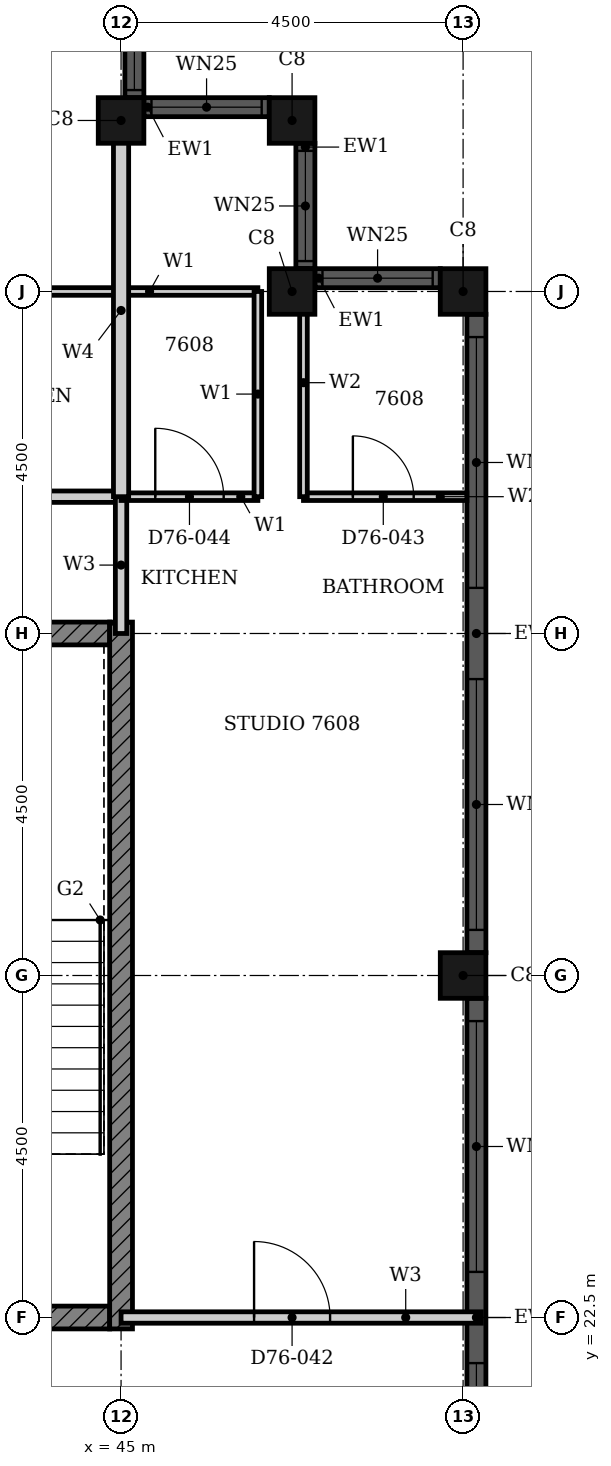
"""IFC4 building model, lengths in metres.
Left out: names, types, materials, properties, quantities, classifications, styles, units other than length and angle.
Written with IfcOpenShell. Run it as: python <this file> out.ifc"""

import sys

from ifc_helpers import new_model, si_unit, direction, frame, frame_2d, origin, origin_2d, place, context, subcontext, project, spatial, rectangle, hollow_rectangle, extrude, element, fill, save


model = new_model("IFC4")
c1 = context("Model", 3, precision=1e-05, world=origin(), true_north=direction((0.0, 1.0)))
c2 = subcontext(c1, "Body", "Model", "MODEL_VIEW")
j1 = project(units=[si_unit("LENGTHUNIT", "METRE"), si_unit("PLANEANGLEUNIT", "RADIAN")], contexts=[c1])
p1 = place(None, origin())
s1 = spatial("IfcSite", under=j1, at=p1, CompositionType="ELEMENT")
p2 = place(p1, origin())
s2 = spatial("IfcBuilding", under=s1, at=p2, CompositionType="ELEMENT")
p3 = place(p2, frame((0.0, 0.0, 298.2)))
s3 = spatial("IfcBuildingStorey", under=s2, at=p3, CompositionType="ELEMENT", Elevation=298.2)
for number, where, z_axis, x_axis in (
    (1, (49.5, 27.0, 0.0), (0.0, 0.0, 1.0), (1.0, 0.0, 0.0)),
    (2, (49.5, 36.0, 0.0), (0.0, 0.0, 1.0), (1.0, 0.0, 0.0)),
    (3, (47.25, 36.0, 0.0), (0.0, 0.0, 1.0), (1.0, 0.0, 0.0)),
    (4, (47.25, 38.25, 0.0), (0.0, 0.0, 1.0), (1.0, 0.0, 0.0)),
    (5, (45.0, 38.25, 0.0), (0.0, 0.0, 1.0), (1.0, 0.0, 0.0)),
):
    element("IfcColumn", number, at=place(p3, frame(where, z_axis=z_axis, x_axis=x_axis)), inside=s3, PredefinedType="COLUMN", context=c2, shape_type="SweptSolid", body=[
        extrude(hollow_rectangle(XDim=0.6, YDim=0.6, WallThickness=0.02, at=origin_2d()), origin(), (0.0, 0.0, 1.0), 3.7),
    ])
p4 = place(p3, frame((49.675, 18.3, 0.0), z_axis=(0.0, 0.0, 1.0), x_axis=(0.0, 1.0, 0.0)))
e6 = element("IfcWall", 6, at=p4, inside=s3, PredefinedType="SOLIDWALL", context=c2, shape_type="SweptSolid", body=[
    extrude(rectangle(XDim=8.4, YDim=0.25, at=frame_2d((4.2, 0.0))), origin(), (0.0, 0.0, 1.0), 3.7),
])
p5 = place(p4, frame((0.3, 0.0, 0.45)))
e7 = element("IfcOpeningElement", 7, at=p5, cuts=e6, PredefinedType="OPENING", context=c2, shape_type="SweptSolid", body=[
    extrude(rectangle(XDim=3.3, YDim=2.3, at=frame_2d((1.65, 1.15))), frame((0.0, 0.135, 0.0), z_axis=(0.0, -1.0, 0.0), x_axis=(1.0, 0.0, 0.0)), (0.0, 0.0, 1.0), 0.27),
])
p6 = place(p4, frame((4.8, 0.0, 0.45)))
e8 = element("IfcOpeningElement", 8, at=p6, cuts=e6, PredefinedType="OPENING", context=c2, shape_type="SweptSolid", body=[
    extrude(rectangle(XDim=3.3, YDim=2.3, at=frame_2d((1.65, 1.15))), frame((0.0, 0.135, 0.0), z_axis=(0.0, -1.0, 0.0), x_axis=(1.0, 0.0, 0.0)), (0.0, 0.0, 1.0), 0.27),
])
p7 = place(p3, frame((49.675, 27.3, 0.0), z_axis=(0.0, 0.0, 1.0), x_axis=(0.0, 1.0, 0.0)))
e9 = element("IfcWall", 9, at=p7, inside=s3, PredefinedType="SOLIDWALL", context=c2, shape_type="SweptSolid", body=[
    extrude(rectangle(XDim=8.4, YDim=0.25, at=frame_2d((4.2, 0.0))), origin(), (0.0, 0.0, 1.0), 3.7),
])
p8 = place(p7, frame((0.3, 0.0, 0.45)))
e10 = element("IfcOpeningElement", 10, at=p8, cuts=e9, PredefinedType="OPENING", context=c2, shape_type="SweptSolid", body=[
    extrude(rectangle(XDim=3.3, YDim=2.3, at=frame_2d((1.65, 1.15))), frame((0.0, 0.135, 0.0), z_axis=(0.0, -1.0, 0.0), x_axis=(1.0, 0.0, 0.0)), (0.0, 0.0, 1.0), 0.27),
])
p9 = place(p7, frame((4.8, 0.0, 0.45)))
e11 = element("IfcOpeningElement", 11, at=p9, cuts=e9, PredefinedType="OPENING", context=c2, shape_type="SweptSolid", body=[
    extrude(rectangle(XDim=3.3, YDim=2.3, at=frame_2d((1.65, 1.15))), frame((0.0, 0.135, 0.0), z_axis=(0.0, -1.0, 0.0), x_axis=(1.0, 0.0, 0.0)), (0.0, 0.0, 1.0), 0.27),
])
p10 = place(p3, frame((49.2, 36.175, 0.0), z_axis=(0.0, 0.0, 1.0), x_axis=(-1.0, 0.0, 0.0)))
e12 = element("IfcWall", 12, at=p10, inside=s3, PredefinedType="SOLIDWALL", context=c2, shape_type="SweptSolid", body=[
    extrude(rectangle(XDim=1.65, YDim=0.25, at=frame_2d((0.825, 0.0))), origin(), (0.0, 0.0, 1.0), 3.7),
])
p11 = place(p10, frame((0.1, 0.0, 0.9)))
e13 = element("IfcOpeningElement", 13, at=p11, cuts=e12, PredefinedType="OPENING", context=c2, shape_type="SweptSolid", body=[
    extrude(rectangle(XDim=1.45, YDim=1.85, at=frame_2d((0.725, 0.925))), frame((0.0, 0.135, 0.0), z_axis=(0.0, -1.0, 0.0), x_axis=(1.0, 0.0, 0.0)), (0.0, 0.0, 1.0), 0.27),
])
p12 = place(p3, frame((47.425, 36.3, 0.0), z_axis=(0.0, 0.0, 1.0), x_axis=(0.0, 1.0, 0.0)))
e14 = element("IfcWall", 14, at=p12, inside=s3, PredefinedType="SOLIDWALL", context=c2, shape_type="SweptSolid", body=[
    extrude(rectangle(XDim=1.65, YDim=0.25, at=frame_2d((0.825, 0.0))), origin(), (0.0, 0.0, 1.0), 3.7),
])
p13 = place(p12, frame((0.1, 0.0, 0.9)))
e15 = element("IfcOpeningElement", 15, at=p13, cuts=e14, PredefinedType="OPENING", context=c2, shape_type="SweptSolid", body=[
    extrude(rectangle(XDim=1.45, YDim=1.85, at=frame_2d((0.725, 0.925))), frame((0.0, 0.135, 0.0), z_axis=(0.0, -1.0, 0.0), x_axis=(1.0, 0.0, 0.0)), (0.0, 0.0, 1.0), 0.27),
])
p14 = place(p3, frame((46.95, 38.425, 0.0), z_axis=(0.0, 0.0, 1.0), x_axis=(-1.0, 0.0, 0.0)))
e16 = element("IfcWall", 16, at=p14, inside=s3, PredefinedType="SOLIDWALL", context=c2, shape_type="SweptSolid", body=[
    extrude(rectangle(XDim=1.65, YDim=0.25, at=frame_2d((0.825, 0.0))), origin(), (0.0, 0.0, 1.0), 3.7),
])
p15 = place(p14, frame((0.1, 0.0, 0.9)))
e17 = element("IfcOpeningElement", 17, at=p15, cuts=e16, PredefinedType="OPENING", context=c2, shape_type="SweptSolid", body=[
    extrude(rectangle(XDim=1.45, YDim=1.85, at=frame_2d((0.725, 0.925))), frame((0.0, 0.135, 0.0), z_axis=(0.0, -1.0, 0.0), x_axis=(1.0, 0.0, 0.0)), (0.0, 0.0, 1.0), 0.27),
])
p16 = place(p3, frame((45.175, 38.55, 0.0), z_axis=(0.0, 0.0, 1.0), x_axis=(0.0, 1.0, 0.0)))
e18 = element("IfcWall", 18, at=p16, inside=s3, PredefinedType="SOLIDWALL", context=c2, shape_type="SweptSolid", body=[
    extrude(rectangle(XDim=1.65, YDim=0.25, at=frame_2d((0.825, 0.0))), origin(), (0.0, 0.0, 1.0), 3.7),
])
p17 = place(p16, frame((0.1, 0.0, 0.9)))
e19 = element("IfcOpeningElement", 19, at=p17, cuts=e18, PredefinedType="OPENING", context=c2, shape_type="SweptSolid", body=[
    extrude(rectangle(XDim=1.45, YDim=1.85, at=frame_2d((0.725, 0.925))), frame((0.0, 0.135, 0.0), z_axis=(0.0, -1.0, 0.0), x_axis=(1.0, 0.0, 0.0)), (0.0, 0.0, 1.0), 0.27),
])
p18 = place(p3, frame((30.339, 22.5, 0.0), z_axis=(0.0, 0.0, 1.0), x_axis=(1.0, 0.0, 0.0)))
e20 = element("IfcWall", 20, at=p18, inside=s3, PredefinedType="SHEAR", context=c2, shape_type="SweptSolid", body=[
    extrude(rectangle(XDim=14.511, YDim=0.3, at=frame_2d((7.255, 0.0))), origin(), (0.0, 0.0, 1.0), 3.4),
])
p19 = place(p18, frame((7.975, 0.0, 0.0)))
e21 = element("IfcOpeningElement", 21, at=p19, cuts=e20, PredefinedType="OPENING", context=c2, shape_type="SweptSolid", body=[
    extrude(rectangle(XDim=1.8, YDim=2.1, at=frame_2d((0.9, 1.05))), frame((0.0, 0.16, 0.0), z_axis=(0.0, -1.0, 0.0), x_axis=(1.0, 0.0, 0.0)), (0.0, 0.0, 1.0), 0.32),
])
p20 = place(p3, frame((40.625, 31.5, 0.0), z_axis=(0.0, 0.0, 1.0), x_axis=(1.0, 0.0, 0.0)))
e22 = element("IfcWall", 22, at=p20, inside=s3, PredefinedType="SHEAR", context=c2, shape_type="SweptSolid", body=[
    extrude(rectangle(XDim=4.225, YDim=0.3, at=frame_2d((2.113, 0.0))), origin(), (0.0, 0.0, 1.0), 3.4),
])
p21 = place(p3, frame((45.0, 22.35, 0.0), z_axis=(0.0, 0.0, 1.0), x_axis=(0.0, 1.0, 0.0)))
e23 = element("IfcWall", 23, at=p21, inside=s3, PredefinedType="SHEAR", context=c2, shape_type="SweptSolid", body=[
    extrude(rectangle(XDim=9.3, YDim=0.3, at=frame_2d((4.65, 0.0))), origin(), (0.0, 0.0, 1.0), 3.4),
])
p22 = place(p3, frame((45.0, 22.5, 0.0), z_axis=(0.0, 0.0, 1.0), x_axis=(1.0, 0.0, 0.0)))
e24 = element("IfcWall", 24, at=p22, inside=s3, PredefinedType="PARTITIONING", context=c2, shape_type="SweptSolid", body=[
    extrude(rectangle(XDim=4.74, YDim=0.15, at=frame_2d((2.37, 0.0))), origin(), (0.0, 0.0, 1.0), 3.4),
])
p23 = place(p22, frame((1.75, 0.0, 0.0)))
e25 = element("IfcOpeningElement", 25, at=p23, cuts=e24, PredefinedType="OPENING", context=c2, shape_type="SweptSolid", body=[
    extrude(rectangle(XDim=1.0, YDim=2.2, at=frame_2d((0.5, 1.1))), frame((0.0, 0.085, 0.0), z_axis=(0.0, -1.0, 0.0), x_axis=(1.0, 0.0, 0.0)), (0.0, 0.0, 1.0), 0.17),
])
p24 = place(p3, frame((38.4, 33.3, 0.0), z_axis=(0.0, 0.0, 1.0), x_axis=(1.0, 0.0, 0.0)))
e26 = element("IfcWall", 26, at=p24, inside=s3, PredefinedType="PARTITIONING", context=c2, shape_type="SweptSolid", body=[
    extrude(rectangle(XDim=6.6, YDim=0.15, at=frame_2d((3.3, 0.0))), origin(), (0.0, 0.0, 1.0), 3.4),
])
p25 = place(p24, frame((1.3, 0.0, 0.0)))
e27 = element("IfcOpeningElement", 27, at=p25, cuts=e26, PredefinedType="OPENING", context=c2, shape_type="SweptSolid", body=[
    extrude(rectangle(XDim=1.0, YDim=2.2, at=frame_2d((0.5, 1.1))), frame((0.0, 0.085, 0.0), z_axis=(0.0, -1.0, 0.0), x_axis=(1.0, 0.0, 0.0)), (0.0, 0.0, 1.0), 0.17),
])
p26 = place(p3, frame((45.0, 31.5, 0.0), z_axis=(0.0, 0.0, 1.0), x_axis=(0.0, 1.0, 0.0)))
e28 = element("IfcWall", 28, at=p26, inside=s3, PredefinedType="PARTITIONING", context=c2, shape_type="SweptSolid", body=[
    extrude(rectangle(XDim=1.8, YDim=0.15, at=frame_2d((0.9, 0.0))), origin(), (0.0, 0.0, 1.0), 3.4),
])
p27 = place(p3, frame((45.0, 33.3, 0.0), z_axis=(0.0, 0.0, 1.0), x_axis=(1.0, 0.0, 0.0)))
e29 = element("IfcWall", 29, at=p27, inside=s3, PredefinedType="PARTITIONING", context=c2, shape_type="SweptSolid", body=[
    extrude(rectangle(XDim=1.8, YDim=0.1, at=frame_2d((0.9, 0.0))), origin(), (0.0, 0.0, 1.0), 3.4),
])
p28 = place(p27, frame((0.45, 0.0, 0.0)))
e30 = element("IfcOpeningElement", 30, at=p28, cuts=e29, PredefinedType="OPENING", context=c2, shape_type="SweptSolid", body=[
    extrude(rectangle(XDim=0.9, YDim=2.1, at=frame_2d((0.45, 1.05))), frame((0.0, 0.06, 0.0), z_axis=(0.0, -1.0, 0.0), x_axis=(1.0, 0.0, 0.0)), (0.0, 0.0, 1.0), 0.12),
])
p29 = place(p3, frame((42.0, 36.0, 0.0), z_axis=(0.0, 0.0, 1.0), x_axis=(1.0, 0.0, 0.0)))
e31 = element("IfcWall", 31, at=p29, inside=s3, PredefinedType="PARTITIONING", context=c2, shape_type="SweptSolid", body=[
    extrude(rectangle(XDim=4.8, YDim=0.1, at=frame_2d((2.4, 0.0))), origin(), (0.0, 0.0, 1.0), 3.4),
])
p30 = place(p29, frame((1.05, 0.0, 0.0)))
e32 = element("IfcOpeningElement", 32, at=p30, cuts=e31, PredefinedType="OPENING", context=c2, shape_type="SweptSolid", body=[
    extrude(rectangle(XDim=0.9, YDim=2.1, at=frame_2d((0.45, 1.05))), frame((0.0, 0.06, 0.0), z_axis=(0.0, -1.0, 0.0), x_axis=(1.0, 0.0, 0.0)), (0.0, 0.0, 1.0), 0.12),
])
p31 = place(p3, frame((46.8, 33.3, 0.0), z_axis=(0.0, 0.0, 1.0), x_axis=(0.0, 1.0, 0.0)))
e33 = element("IfcWall", 33, at=p31, inside=s3, PredefinedType="PARTITIONING", context=c2, shape_type="SweptSolid", body=[
    extrude(rectangle(XDim=2.7, YDim=0.1, at=frame_2d((1.35, 0.0))), origin(), (0.0, 0.0, 1.0), 3.4),
])
p32 = place(p3, frame((45.0, 33.3, 0.0), z_axis=(0.0, 0.0, 1.0), x_axis=(0.0, 1.0, 0.0)))
e34 = element("IfcWall", 34, at=p32, inside=s3, PredefinedType="PARTITIONING", context=c2, shape_type="SweptSolid", body=[
    extrude(rectangle(XDim=4.9, YDim=0.2, at=frame_2d((2.45, 0.0))), origin(), (0.0, 0.0, 1.0), 3.4),
])
p33 = place(p3, frame((47.4, 33.3, 0.0), z_axis=(0.0, 0.0, 1.0), x_axis=(1.0, 0.0, 0.0)))
e35 = element("IfcWall", 35, at=p33, inside=s3, PredefinedType="PARTITIONING", context=c2, shape_type="SweptSolid", body=[
    extrude(rectangle(XDim=2.15, YDim=0.1, at=frame_2d((1.075, 0.0))), origin(), (0.0, 0.0, 1.0), 3.4),
])
p34 = place(p33, frame((0.65, 0.0, 0.0)))
e36 = element("IfcOpeningElement", 36, at=p34, cuts=e35, PredefinedType="OPENING", context=c2, shape_type="SweptSolid", body=[
    extrude(rectangle(XDim=0.8, YDim=2.1, at=frame_2d((0.4, 1.05))), frame((0.0, 0.06, 0.0), z_axis=(0.0, -1.0, 0.0), x_axis=(1.0, 0.0, 0.0)), (0.0, 0.0, 1.0), 0.12),
])
p35 = place(p3, frame((47.4, 33.3, 0.0), z_axis=(0.0, 0.0, 1.0), x_axis=(0.0, 1.0, 0.0)))
e37 = element("IfcWall", 37, at=p35, inside=s3, PredefinedType="PARTITIONING", context=c2, shape_type="SweptSolid", body=[
    extrude(rectangle(XDim=3.0, YDim=0.1, at=frame_2d((1.5, 0.0))), origin(), (0.0, 0.0, 1.0), 3.4),
])
p36 = place(p5, origin())
e38 = element("IfcWindow", 38, at=p36, inside=s3, PartitioningType="SINGLE_PANEL", PredefinedType="WINDOW", context=c2, shape_type="SweptSolid", body=[
    extrude(rectangle(XDim=3.3, YDim=2.3, at=frame_2d((1.65, 1.15))), frame((0.0, 0.03, 0.0), z_axis=(0.0, -1.0, 0.0), x_axis=(1.0, 0.0, 0.0)), (0.0, 0.0, 1.0), 0.06),
])
fill(e7, e38)
p37 = place(p6, origin())
e39 = element("IfcWindow", 39, at=p37, inside=s3, PartitioningType="SINGLE_PANEL", PredefinedType="WINDOW", context=c2, shape_type="SweptSolid", body=[
    extrude(rectangle(XDim=3.3, YDim=2.3, at=frame_2d((1.65, 1.15))), frame((0.0, 0.03, 0.0), z_axis=(0.0, -1.0, 0.0), x_axis=(1.0, 0.0, 0.0)), (0.0, 0.0, 1.0), 0.06),
])
fill(e8, e39)
p38 = place(p8, origin())
e40 = element("IfcWindow", 40, at=p38, inside=s3, PartitioningType="SINGLE_PANEL", PredefinedType="WINDOW", context=c2, shape_type="SweptSolid", body=[
    extrude(rectangle(XDim=3.3, YDim=2.3, at=frame_2d((1.65, 1.15))), frame((0.0, 0.03, 0.0), z_axis=(0.0, -1.0, 0.0), x_axis=(1.0, 0.0, 0.0)), (0.0, 0.0, 1.0), 0.06),
])
fill(e10, e40)
p39 = place(p9, origin())
e41 = element("IfcWindow", 41, at=p39, inside=s3, PartitioningType="SINGLE_PANEL", PredefinedType="WINDOW", context=c2, shape_type="SweptSolid", body=[
    extrude(rectangle(XDim=3.3, YDim=2.3, at=frame_2d((1.65, 1.15))), frame((0.0, 0.03, 0.0), z_axis=(0.0, -1.0, 0.0), x_axis=(1.0, 0.0, 0.0)), (0.0, 0.0, 1.0), 0.06),
])
fill(e11, e41)
p40 = place(p11, origin())
e42 = element("IfcWindow", 42, at=p40, inside=s3, PartitioningType="SINGLE_PANEL", PredefinedType="WINDOW", context=c2, shape_type="SweptSolid", body=[
    extrude(rectangle(XDim=1.45, YDim=1.85, at=frame_2d((0.725, 0.925))), frame((0.0, 0.03, 0.0), z_axis=(0.0, -1.0, 0.0), x_axis=(1.0, 0.0, 0.0)), (0.0, 0.0, 1.0), 0.06),
])
fill(e13, e42)
p41 = place(p13, origin())
e43 = element("IfcWindow", 43, at=p41, inside=s3, PartitioningType="SINGLE_PANEL", PredefinedType="WINDOW", context=c2, shape_type="SweptSolid", body=[
    extrude(rectangle(XDim=1.45, YDim=1.85, at=frame_2d((0.725, 0.925))), frame((0.0, 0.03, 0.0), z_axis=(0.0, -1.0, 0.0), x_axis=(1.0, 0.0, 0.0)), (0.0, 0.0, 1.0), 0.06),
])
fill(e15, e43)
p42 = place(p15, origin())
e44 = element("IfcWindow", 44, at=p42, inside=s3, PartitioningType="SINGLE_PANEL", PredefinedType="WINDOW", context=c2, shape_type="SweptSolid", body=[
    extrude(rectangle(XDim=1.45, YDim=1.85, at=frame_2d((0.725, 0.925))), frame((0.0, 0.03, 0.0), z_axis=(0.0, -1.0, 0.0), x_axis=(1.0, 0.0, 0.0)), (0.0, 0.0, 1.0), 0.06),
])
fill(e17, e44)
p43 = place(p17, origin())
e45 = element("IfcWindow", 45, at=p43, inside=s3, PartitioningType="SINGLE_PANEL", PredefinedType="WINDOW", context=c2, shape_type="SweptSolid", body=[
    extrude(rectangle(XDim=1.45, YDim=1.85, at=frame_2d((0.725, 0.925))), frame((0.0, 0.03, 0.0), z_axis=(0.0, -1.0, 0.0), x_axis=(1.0, 0.0, 0.0)), (0.0, 0.0, 1.0), 0.06),
])
fill(e19, e45)
p44 = place(p23, origin())
e46 = element("IfcDoor", 46, at=p44, inside=s3, OperationType="SINGLE_SWING_RIGHT", PredefinedType="DOOR", context=c2, shape_type="SweptSolid", body=[
    extrude(rectangle(XDim=1.0, YDim=2.2, at=frame_2d((0.5, 1.1))), frame((0.0, 0.025, 0.0), z_axis=(0.0, -1.0, 0.0), x_axis=(1.0, 0.0, 0.0)), (0.0, 0.0, 1.0), 0.05),
])
fill(e25, e46)
p45 = place(p34, origin())
e47 = element("IfcDoor", 47, at=p45, inside=s3, OperationType="SINGLE_SWING_LEFT", PredefinedType="DOOR", context=c2, shape_type="SweptSolid", body=[
    extrude(rectangle(XDim=0.8, YDim=2.1, at=frame_2d((0.4, 1.05))), frame((0.0, 0.025, 0.0), z_axis=(0.0, -1.0, 0.0), x_axis=(1.0, 0.0, 0.0)), (0.0, 0.0, 1.0), 0.05),
])
fill(e36, e47)
p46 = place(p28, origin())
e48 = element("IfcDoor", 48, at=p46, inside=s3, OperationType="SINGLE_SWING_RIGHT", PredefinedType="DOOR", context=c2, shape_type="SweptSolid", body=[
    extrude(rectangle(XDim=0.9, YDim=2.1, at=frame_2d((0.45, 1.05))), frame((0.0, 0.025, 0.0), z_axis=(0.0, -1.0, 0.0), x_axis=(1.0, 0.0, 0.0)), (0.0, 0.0, 1.0), 0.05),
])
fill(e30, e48)
save(model, sys.argv[1])
